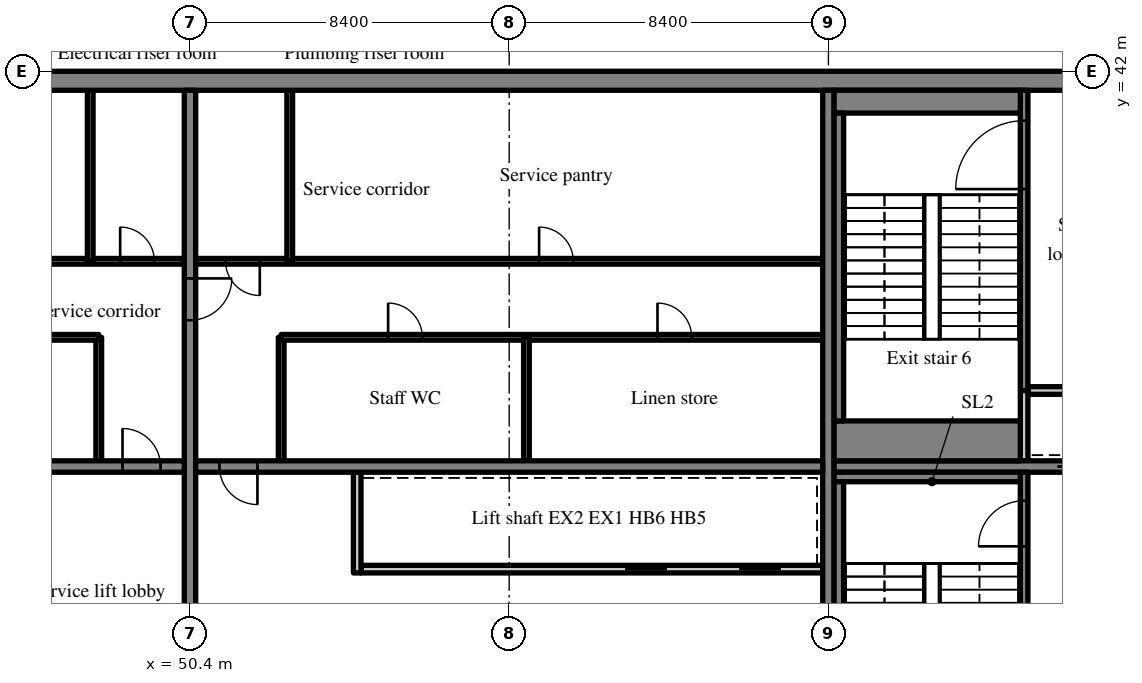
"""IFC4 building model, lengths in metres.
Left out: names, types, materials, properties, quantities, classifications, styles, units other than length and angle.
Written with IfcOpenShell. Run it as: python <this file> out.ifc"""

import sys

from ifc_helpers import new_model, si_unit, direction, frame, frame_2d, origin, place, context, subcontext, project, spatial, rectangle, extrude, source, transform, mapped, element, fill, save


model = new_model("IFC4")
c1 = context("Model", 3, precision=1e-05, world=origin(), true_north=direction((0.0, 1.0)))
c2 = subcontext(c1, "Body", "Model", "MODEL_VIEW")
j1 = project(units=[si_unit("LENGTHUNIT", "METRE"), si_unit("PLANEANGLEUNIT", "RADIAN")], contexts=[c1])
p1 = place(None, origin())
s1 = spatial("IfcSite", under=j1, at=p1, CompositionType="ELEMENT")
p2 = place(p1, origin())
s2 = spatial("IfcBuilding", under=s1, at=p2, CompositionType="ELEMENT")
p3 = place(p2, frame((0.0, 0.0, 277.7)))
s3 = spatial("IfcBuildingStorey", under=s2, at=p3, CompositionType="ELEMENT", Elevation=277.7)
m1 = source(origin(), c2, "Body", "SweptSolid", [
    extrude(rectangle(XDim=50.4, YDim=0.5, at=frame_2d((25.2, 0.0))), origin(), (0.0, 0.0, 1.0), 3.72),
])
p4 = place(p3, frame((25.2, 41.75, 0.0), z_axis=(0.0, 0.0, 1.0), x_axis=(1.0, 0.0, 0.0)))
e1 = element("IfcWall", 1, at=p4, inside=s3, PredefinedType="SHEAR", context=c2, shape_type="MappedRepresentation", body=[
    mapped(m1, transform((0.0, 0.0, 0.0), scale=1.0)),
])
m2 = source(origin(), c2, "Body", "SweptSolid", [
    extrude(rectangle(XDim=19.0, YDim=0.3, at=frame_2d((9.5, 0.0))), origin(), (0.0, 0.0, 1.0), 3.72),
])
p5 = place(p3, frame((50.4, 22.5, 0.0), z_axis=(0.0, 0.0, 1.0), x_axis=(0.0, 1.0, 0.0)))
e2 = element("IfcWall", 2, at=p5, inside=s3, PredefinedType="SHEAR", context=c2, shape_type="MappedRepresentation", body=[
    mapped(m2, transform((0.0, 0.0, 0.0), scale=1.0)),
])
m3 = source(origin(), c2, "Body", "SweptSolid", [
    extrude(rectangle(XDim=1.1, YDim=2.1, at=frame_2d((0.55, 1.05))), frame((0.0, 0.16, 0.0), z_axis=(0.0, -1.0, 0.0), x_axis=(1.0, 0.0, 0.0)), (0.0, 0.0, 1.0), 0.32),
])
p6 = place(p5, frame((12.95, 0.0, 0.0)))
e3 = element("IfcOpeningElement", 3, at=p6, cuts=e2, PredefinedType="OPENING", context=c2, shape_type="MappedRepresentation", body=[
    mapped(m3, transform((0.0, 0.0, 0.0), scale=1.0)),
])
p7 = place(p3, frame((67.2, 22.5, 0.0), z_axis=(0.0, 0.0, 1.0), x_axis=(0.0, 1.0, 0.0)))
e4 = element("IfcWall", 4, at=p7, inside=s3, PredefinedType="SHEAR", context=c2, shape_type="MappedRepresentation", body=[
    mapped(m2, transform((0.0, 0.0, 0.0), scale=1.0)),
])
m4 = source(origin(), c2, "Body", "SweptSolid", [
    extrude(rectangle(XDim=16.5, YDim=0.3, at=frame_2d((8.25, 0.0))), origin(), (0.0, 0.0, 1.0), 3.72),
])
p8 = place(p3, frame((33.75, 31.6, 0.0), z_axis=(0.0, 0.0, 1.0), x_axis=(1.0, 0.0, 0.0)))
e5 = element("IfcWall", 5, at=p8, inside=s3, PredefinedType="SHEAR", context=c2, shape_type="MappedRepresentation", body=[
    mapped(m4, transform((0.0, 0.0, 0.0), scale=1.0)),
])
m5 = source(origin(), c2, "Body", "SweptSolid", [
    extrude(rectangle(XDim=1.0, YDim=2.1, at=frame_2d((0.5, 1.05))), frame((0.0, 0.16, 0.0), z_axis=(0.0, -1.0, 0.0), x_axis=(1.0, 0.0, 0.0)), (0.0, 0.0, 1.0), 0.32),
])
p9 = place(p8, frame((14.875, 0.0, 0.0)))
e6 = element("IfcOpeningElement", 6, at=p9, cuts=e5, PredefinedType="OPENING", context=c2, shape_type="MappedRepresentation", body=[
    mapped(m5, transform((0.0, 0.0, 0.0), scale=1.0)),
])
p10 = place(p3, frame((50.55, 31.6, 0.0), z_axis=(0.0, 0.0, 1.0), x_axis=(1.0, 0.0, 0.0)))
e7 = element("IfcWall", 7, at=p10, inside=s3, PredefinedType="SHEAR", context=c2, shape_type="MappedRepresentation", body=[
    mapped(m4, transform((0.0, 0.0, 0.0), scale=1.0)),
])
p11 = place(p10, frame((0.625, 0.0, 0.0)))
e8 = element("IfcOpeningElement", 8, at=p11, cuts=e7, PredefinedType="OPENING", context=c2, shape_type="MappedRepresentation", body=[
    mapped(m5, transform((0.0, 0.0, 0.0), scale=1.0)),
])
m6 = source(origin(), c2, "Body", "SweptSolid", [
    extrude(rectangle(XDim=7.75, YDim=0.3, at=frame_2d((3.875, 0.0))), origin(), (0.0, 0.0, 1.0), 3.72),
])
p12 = place(p3, frame((67.35, 31.6, 0.0), z_axis=(0.0, 0.0, 1.0), x_axis=(1.0, 0.0, 0.0)))
e9 = element("IfcWall", 9, at=p12, inside=s3, PredefinedType="SHEAR", context=c2, shape_type="MappedRepresentation", body=[
    mapped(m6, transform((0.0, 0.0, 0.0), scale=1.0)),
])
p13 = place(p12, frame((5.875, 0.0, 0.0)))
e10 = element("IfcOpeningElement", 10, at=p13, cuts=e9, PredefinedType="OPENING", context=c2, shape_type="MappedRepresentation", body=[
    mapped(m3, transform((0.0, 0.0, 0.0), scale=1.0)),
])
m7 = source(origin(), c2, "Body", "SweptSolid", [
    extrude(rectangle(XDim=3.25, YDim=0.15, at=frame_2d((1.625, 0.0))), origin(), (0.0, 0.0, 1.0), 3.72),
])
p14 = place(p3, frame((48.0, 31.75, 0.0), z_axis=(0.0, 0.0, 1.0), x_axis=(0.0, 1.0, 0.0)))
e11 = element("IfcWall", 11, at=p14, inside=s3, PredefinedType="PARTITIONING", context=c2, shape_type="MappedRepresentation", body=[
    mapped(m7, transform((0.0, 0.0, 0.0), scale=1.0)),
])
m8 = source(origin(), c2, "Body", "SweptSolid", [
    extrude(rectangle(XDim=14.25, YDim=0.15, at=frame_2d((7.125, 0.0))), origin(), (0.0, 0.0, 1.0), 3.72),
])
p15 = place(p3, frame((33.75, 35.0, 0.0), z_axis=(0.0, 0.0, 1.0), x_axis=(1.0, 0.0, 0.0)))
e12 = element("IfcWall", 12, at=p15, inside=s3, PredefinedType="PARTITIONING", context=c2, shape_type="MappedRepresentation", body=[
    mapped(m8, transform((0.0, 0.0, 0.0), scale=1.0)),
])
m9 = source(origin(), c2, "Body", "SweptSolid", [
    extrude(rectangle(XDim=0.9, YDim=2.1, at=frame_2d((0.45, 1.05))), frame((0.0, 0.085, 0.0), z_axis=(0.0, -1.0, 0.0), x_axis=(1.0, 0.0, 0.0)), (0.0, 0.0, 1.0), 0.17),
])
p16 = place(p15, frame((6.637, 0.0, 0.0)))
e13 = element("IfcOpeningElement", 13, at=p16, cuts=e12, PredefinedType="OPENING", context=c2, shape_type="MappedRepresentation", body=[
    mapped(m9, transform((0.0, 0.0, 0.0), scale=1.0)),
])
m10 = source(origin(), c2, "Body", "SweptSolid", [
    extrude(rectangle(XDim=16.5, YDim=0.15, at=frame_2d((8.25, 0.0))), origin(), (0.0, 0.0, 1.0), 3.72),
])
p17 = place(p3, frame((33.75, 37.0, 0.0), z_axis=(0.0, 0.0, 1.0), x_axis=(1.0, 0.0, 0.0)))
e14 = element("IfcWall", 14, at=p17, inside=s3, PredefinedType="PARTITIONING", context=c2, shape_type="MappedRepresentation", body=[
    mapped(m10, transform((0.0, 0.0, 0.0), scale=1.0)),
])
p18 = place(p17, frame((0.787, 0.0, 0.0)))
e15 = element("IfcOpeningElement", 15, at=p18, cuts=e14, PredefinedType="OPENING", context=c2, shape_type="MappedRepresentation", body=[
    mapped(m9, transform((0.0, 0.0, 0.0), scale=1.0)),
])
p19 = place(p17, frame((3.675, 0.0, 0.0)))
e16 = element("IfcOpeningElement", 16, at=p19, cuts=e14, PredefinedType="OPENING", context=c2, shape_type="MappedRepresentation", body=[
    mapped(m9, transform((0.0, 0.0, 0.0), scale=1.0)),
])
p20 = place(p17, frame((9.45, 0.0, 0.0)))
e17 = element("IfcOpeningElement", 17, at=p20, cuts=e14, PredefinedType="OPENING", context=c2, shape_type="MappedRepresentation", body=[
    mapped(m9, transform((0.0, 0.0, 0.0), scale=1.0)),
])
p21 = place(p17, frame((14.813, 0.0, 0.0)))
e18 = element("IfcOpeningElement", 18, at=p21, cuts=e14, PredefinedType="OPENING", context=c2, shape_type="MappedRepresentation", body=[
    mapped(m9, transform((0.0, 0.0, 0.0), scale=1.0)),
])
m11 = source(origin(), c2, "Body", "SweptSolid", [
    extrude(rectangle(XDim=4.5, YDim=0.15, at=frame_2d((2.25, 0.0))), origin(), (0.0, 0.0, 1.0), 3.72),
])
p22 = place(p3, frame((47.775, 37.0, 0.0), z_axis=(0.0, 0.0, 1.0), x_axis=(0.0, 1.0, 0.0)))
e19 = element("IfcWall", 19, at=p22, inside=s3, PredefinedType="PARTITIONING", context=c2, shape_type="MappedRepresentation", body=[
    mapped(m11, transform((0.0, 0.0, 0.0), scale=1.0)),
])
m12 = source(origin(), c2, "Body", "SweptSolid", [
    extrude(rectangle(XDim=12.15, YDim=0.2, at=frame_2d((6.075, 0.0))), origin(), (0.0, 0.0, 1.0), 3.72),
])
p23 = place(p3, frame((67.05, 28.9, 0.0), z_axis=(0.0, 0.0, 1.0), x_axis=(-1.0, 0.0, 0.0)))
e20 = element("IfcWall", 20, at=p23, inside=s3, PredefinedType="SOLIDWALL", context=c2, shape_type="MappedRepresentation", body=[
    mapped(m12, transform((0.0, 0.0, 0.0), scale=1.0)),
])
m13 = source(origin(), c2, "Body", "SweptSolid", [
    extrude(rectangle(XDim=1.1, YDim=2.1, at=frame_2d((0.55, 1.05))), frame((0.0, 0.11, 0.0), z_axis=(0.0, -1.0, 0.0), x_axis=(1.0, 0.0, 0.0)), (0.0, 0.0, 1.0), 0.22),
])
p24 = place(p23, frame((1.1, 0.0, 0.0)))
e21 = element("IfcOpeningElement", 21, at=p24, cuts=e20, PredefinedType="OPENING", context=c2, shape_type="MappedRepresentation", body=[
    mapped(m13, transform((0.0, 0.0, 0.0), scale=1.0)),
])
p25 = place(p23, frame((4.1, 0.0, 0.0)))
e22 = element("IfcOpeningElement", 22, at=p25, cuts=e20, PredefinedType="OPENING", context=c2, shape_type="MappedRepresentation", body=[
    mapped(m13, transform((0.0, 0.0, 0.0), scale=1.0)),
])
m14 = source(origin(), c2, "Body", "SweptSolid", [
    extrude(rectangle(XDim=2.65, YDim=0.2, at=frame_2d((1.325, 0.0))), origin(), (0.0, 0.0, 1.0), 3.72),
])
p26 = place(p3, frame((54.8, 28.8, 0.0), z_axis=(0.0, 0.0, 1.0), x_axis=(0.0, 1.0, 0.0)))
e23 = element("IfcWall", 23, at=p26, inside=s3, PredefinedType="SOLIDWALL", context=c2, shape_type="MappedRepresentation", body=[
    mapped(m14, transform((0.0, 0.0, 0.0), scale=1.0)),
])
p27 = place(p3, frame((52.8, 31.75, 0.0), z_axis=(0.0, 0.0, 1.0), x_axis=(0.0, 1.0, 0.0)))
e24 = element("IfcWall", 24, at=p27, inside=s3, PredefinedType="PARTITIONING", context=c2, shape_type="MappedRepresentation", body=[
    mapped(m7, transform((0.0, 0.0, 0.0), scale=1.0)),
])
p28 = place(p3, frame((67.05, 35.0, 0.0), z_axis=(0.0, 0.0, 1.0), x_axis=(-1.0, 0.0, 0.0)))
e25 = element("IfcWall", 25, at=p28, inside=s3, PredefinedType="PARTITIONING", context=c2, shape_type="MappedRepresentation", body=[
    mapped(m8, transform((0.0, 0.0, 0.0), scale=1.0)),
])
p29 = place(p28, frame((3.448, 0.0, 0.0)))
e26 = element("IfcOpeningElement", 26, at=p29, cuts=e25, PredefinedType="OPENING", context=c2, shape_type="MappedRepresentation", body=[
    mapped(m9, transform((0.0, 0.0, 0.0), scale=1.0)),
])
p30 = place(p28, frame((10.536, 0.0, 0.0)))
e27 = element("IfcOpeningElement", 27, at=p30, cuts=e25, PredefinedType="OPENING", context=c2, shape_type="MappedRepresentation", body=[
    mapped(m9, transform((0.0, 0.0, 0.0), scale=1.0)),
])
p31 = place(p3, frame((67.05, 37.0, 0.0), z_axis=(0.0, 0.0, 1.0), x_axis=(-1.0, 0.0, 0.0)))
e28 = element("IfcWall", 28, at=p31, inside=s3, PredefinedType="PARTITIONING", context=c2, shape_type="MappedRepresentation", body=[
    mapped(m10, transform((0.0, 0.0, 0.0), scale=1.0)),
])
p32 = place(p31, frame((6.563, 0.0, 0.0)))
e29 = element("IfcOpeningElement", 29, at=p32, cuts=e28, PredefinedType="OPENING", context=c2, shape_type="MappedRepresentation", body=[
    mapped(m9, transform((0.0, 0.0, 0.0), scale=1.0)),
])
p33 = place(p31, frame((14.813, 0.0, 0.0)))
e30 = element("IfcOpeningElement", 30, at=p33, cuts=e28, PredefinedType="OPENING", context=c2, shape_type="MappedRepresentation", body=[
    mapped(m9, transform((0.0, 0.0, 0.0), scale=1.0)),
])
p34 = place(p3, frame((59.254, 31.75, 0.0), z_axis=(0.0, 0.0, 1.0), x_axis=(0.0, 1.0, 0.0)))
e31 = element("IfcWall", 31, at=p34, inside=s3, PredefinedType="PARTITIONING", context=c2, shape_type="MappedRepresentation", body=[
    mapped(m7, transform((0.0, 0.0, 0.0), scale=1.0)),
])
p35 = place(p3, frame((53.025, 37.0, 0.0), z_axis=(0.0, 0.0, 1.0), x_axis=(0.0, 1.0, 0.0)))
e32 = element("IfcWall", 32, at=p35, inside=s3, PredefinedType="PARTITIONING", context=c2, shape_type="MappedRepresentation", body=[
    mapped(m11, transform((0.0, 0.0, 0.0), scale=1.0)),
])
m15 = source(origin(), c2, "Body", "SweptSolid", [
    extrude(rectangle(XDim=8.95, YDim=0.2, at=frame_2d((4.475, 0.0))), origin(), (0.0, 0.0, 1.0), 3.72),
])
p36 = place(p3, frame((72.35, 22.5, 0.0), z_axis=(0.0, 0.0, 1.0), x_axis=(0.0, 1.0, 0.0)))
e33 = element("IfcWall", 33, at=p36, inside=s3, PredefinedType="SOLIDWALL", context=c2, shape_type="MappedRepresentation", body=[
    mapped(m15, transform((0.0, 0.0, 0.0), scale=1.0)),
])
m16 = source(origin(), c2, "Body", "SweptSolid", [
    extrude(rectangle(XDim=1.2, YDim=2.1, at=frame_2d((0.6, 1.05))), frame((0.0, 0.11, 0.0), z_axis=(0.0, -1.0, 0.0), x_axis=(1.0, 0.0, 0.0)), (0.0, 0.0, 1.0), 0.22),
])
p37 = place(p36, frame((7.0, 0.0, 0.0)))
e34 = element("IfcOpeningElement", 34, at=p37, cuts=e33, PredefinedType="OPENING", context=c2, shape_type="MappedRepresentation", body=[
    mapped(m16, transform((0.0, 0.0, 0.0), scale=1.0)),
])
m17 = source(origin(), c2, "Body", "SweptSolid", [
    extrude(rectangle(XDim=1.85, YDim=0.2, at=frame_2d((0.925, 0.0))), origin(), (0.0, 0.0, 1.0), 3.72),
])
p38 = place(p3, frame((72.35, 31.75, 0.0), z_axis=(0.0, 0.0, 1.0), x_axis=(0.0, 1.0, 0.0)))
e35 = element("IfcWall", 35, at=p38, inside=s3, PredefinedType="SOLIDWALL", context=c2, shape_type="MappedRepresentation", body=[
    mapped(m17, transform((0.0, 0.0, 0.0), scale=1.0)),
])
m18 = source(origin(), c2, "Body", "SweptSolid", [
    extrude(rectangle(XDim=2.65, YDim=0.2, at=frame_2d((1.325, 0.0))), origin(), (0.0, 0.0, 1.0), 3.72),
])
p39 = place(p3, frame((72.45, 33.6, 0.0), z_axis=(0.0, 0.0, 1.0), x_axis=(1.0, 0.0, 0.0)))
e36 = element("IfcWall", 36, at=p39, inside=s3, PredefinedType="SOLIDWALL", context=c2, shape_type="MappedRepresentation", body=[
    mapped(m18, transform((0.0, 0.0, 0.0), scale=1.0)),
])
m19 = source(origin(), c2, "Body", "SweptSolid", [
    extrude(rectangle(XDim=7.9, YDim=0.2, at=frame_2d((3.95, 0.0))), origin(), (0.0, 0.0, 1.0), 3.72),
])
p40 = place(p3, frame((72.35, 33.6, 0.0), z_axis=(0.0, 0.0, 1.0), x_axis=(0.0, 1.0, 0.0)))
e37 = element("IfcWall", 37, at=p40, inside=s3, PredefinedType="SOLIDWALL", context=c2, shape_type="MappedRepresentation", body=[
    mapped(m19, transform((0.0, 0.0, 0.0), scale=1.0)),
])
m20 = source(origin(), c2, "Body", "SweptSolid", [
    extrude(rectangle(XDim=1.8, YDim=2.1, at=frame_2d((0.9, 1.05))), frame((0.0, 0.11, 0.0), z_axis=(0.0, -1.0, 0.0), x_axis=(1.0, 0.0, 0.0)), (0.0, 0.0, 1.0), 0.22),
])
p41 = place(p40, frame((5.3, 0.0, 0.0)))
e38 = element("IfcOpeningElement", 38, at=p41, cuts=e37, PredefinedType="OPENING", context=c2, shape_type="MappedRepresentation", body=[
    mapped(m20, transform((0.0, 0.0, 0.0), scale=1.0)),
])
m21 = source(origin(), c2, "Body", "SweptSolid", [
    extrude(rectangle(XDim=4.9, YDim=0.25, at=frame_2d((2.45, 0.0))), origin(), (0.0, 0.0, 1.0), 3.72),
])
p42 = place(p3, frame((67.35, 31.325, 0.0), z_axis=(0.0, 0.0, 1.0), x_axis=(1.0, 0.0, 0.0)))
e39 = element("IfcWall", 39, at=p42, inside=s3, PredefinedType="SOLIDWALL", context=c2, shape_type="MappedRepresentation", body=[
    mapped(m21, transform((0.0, 0.0, 0.0), scale=1.0)),
])
m22 = source(origin(), c2, "Body", "SweptSolid", [
    extrude(rectangle(XDim=8.1, YDim=0.25, at=frame_2d((4.05, 0.0))), origin(), (0.0, 0.0, 1.0), 3.72),
])
p43 = place(p3, frame((67.475, 23.1, 0.0), z_axis=(0.0, 0.0, 1.0), x_axis=(0.0, 1.0, 0.0)))
e40 = element("IfcWall", 40, at=p43, inside=s3, PredefinedType="SOLIDWALL", context=c2, shape_type="MappedRepresentation", body=[
    mapped(m22, transform((0.0, 0.0, 0.0), scale=1.0)),
])
m23 = source(origin(), c2, "Body", "SweptSolid", [
    extrude(rectangle(XDim=4.9, YDim=0.6, at=frame_2d((2.45, 0.0))), origin(), (0.0, 0.0, 1.0), 3.72),
])
p44 = place(p3, frame((67.35, 41.2, 0.0), z_axis=(0.0, 0.0, 1.0), x_axis=(1.0, 0.0, 0.0)))
e41 = element("IfcWall", 41, at=p44, inside=s3, PredefinedType="SOLIDWALL", context=c2, shape_type="MappedRepresentation", body=[
    mapped(m23, transform((0.0, 0.0, 0.0), scale=1.0)),
])
m24 = source(origin(), c2, "Body", "SweptSolid", [
    extrude(rectangle(XDim=4.9, YDim=1.05, at=frame_2d((2.45, 0.0))), origin(), (0.0, 0.0, 1.0), 3.72),
])
p45 = place(p3, frame((67.35, 32.275, 0.0), z_axis=(0.0, 0.0, 1.0), x_axis=(1.0, 0.0, 0.0)))
e42 = element("IfcWall", 42, at=p45, inside=s3, PredefinedType="SOLIDWALL", context=c2, shape_type="MappedRepresentation", body=[
    mapped(m24, transform((0.0, 0.0, 0.0), scale=1.0)),
])
p46 = place(p3, frame((67.475, 32.8, 0.0), z_axis=(0.0, 0.0, 1.0), x_axis=(0.0, 1.0, 0.0)))
e43 = element("IfcWall", 43, at=p46, inside=s3, PredefinedType="SOLIDWALL", context=c2, shape_type="MappedRepresentation", body=[
    mapped(m22, transform((0.0, 0.0, 0.0), scale=1.0)),
])
m25 = source(origin(), c2, "Body", "SweptSolid", [
    extrude(rectangle(XDim=1.0, YDim=2.1, at=frame_2d((0.5, 1.05))), frame((0.0, 0.025, 0.0), z_axis=(0.0, -1.0, 0.0), x_axis=(1.0, 0.0, 0.0)), (0.0, 0.0, 1.0), 0.05),
])
p47 = place(p9, origin())
e44 = element("IfcDoor", 44, at=p47, inside=s3, OperationType="SINGLE_SWING_LEFT", PredefinedType="DOOR", context=c2, shape_type="MappedRepresentation", body=[
    mapped(m25, transform((0.0, 0.0, 0.0), scale=1.0)),
])
fill(e6, e44)
m26 = source(origin(), c2, "Body", "SweptSolid", [
    extrude(rectangle(XDim=0.9, YDim=2.1, at=frame_2d((0.45, 1.05))), frame((0.0, 0.025, 0.0), z_axis=(0.0, -1.0, 0.0), x_axis=(1.0, 0.0, 0.0)), (0.0, 0.0, 1.0), 0.05),
])
p48 = place(p21, origin())
e45 = element("IfcDoor", 45, at=p48, inside=s3, OperationType="SINGLE_SWING_LEFT", PredefinedType="DOOR", context=c2, shape_type="MappedRepresentation", body=[
    mapped(m26, transform((0.0, 0.0, 0.0), scale=1.0)),
])
fill(e18, e45)
p49 = place(p11, origin())
e46 = element("IfcDoor", 46, at=p49, inside=s3, OperationType="SINGLE_SWING_RIGHT", PredefinedType="DOOR", context=c2, shape_type="MappedRepresentation", body=[
    mapped(m25, transform((0.0, 0.0, 0.0), scale=1.0)),
])
fill(e8, e46)
m27 = source(origin(), c2, "Body", "SweptSolid", [
    extrude(rectangle(XDim=1.1, YDim=2.1, at=frame_2d((0.55, 1.05))), frame((0.0, 0.025, 0.0), z_axis=(0.0, -1.0, 0.0), x_axis=(1.0, 0.0, 0.0)), (0.0, 0.0, 1.0), 0.05),
])
p50 = place(p24, origin())
e47 = element("IfcDoor", 47, at=p50, inside=s3, OperationType="SLIDING_TO_RIGHT", PredefinedType="DOOR", context=c2, shape_type="MappedRepresentation", body=[
    mapped(m27, transform((0.0, 0.0, 0.0), scale=1.0)),
])
fill(e21, e47)
p51 = place(p25, origin())
e48 = element("IfcDoor", 48, at=p51, inside=s3, OperationType="SLIDING_TO_LEFT", PredefinedType="DOOR", context=c2, shape_type="MappedRepresentation", body=[
    mapped(m27, transform((0.0, 0.0, 0.0), scale=1.0)),
])
fill(e22, e48)
p52 = place(p29, origin())
e49 = element("IfcDoor", 49, at=p52, inside=s3, OperationType="SINGLE_SWING_RIGHT", PredefinedType="DOOR", context=c2, shape_type="MappedRepresentation", body=[
    mapped(m26, transform((0.0, 0.0, 0.0), scale=1.0)),
])
fill(e26, e49)
p53 = place(p30, origin())
e50 = element("IfcDoor", 50, at=p53, inside=s3, OperationType="SINGLE_SWING_RIGHT", PredefinedType="DOOR", context=c2, shape_type="MappedRepresentation", body=[
    mapped(m26, transform((0.0, 0.0, 0.0), scale=1.0)),
])
fill(e27, e50)
p54 = place(p32, origin())
e51 = element("IfcDoor", 51, at=p54, inside=s3, OperationType="SINGLE_SWING_RIGHT", PredefinedType="DOOR", context=c2, shape_type="MappedRepresentation", body=[
    mapped(m26, transform((0.0, 0.0, 0.0), scale=1.0)),
])
fill(e29, e51)
p55 = place(p33, origin())
e52 = element("IfcDoor", 52, at=p55, inside=s3, OperationType="SINGLE_SWING_LEFT", PredefinedType="DOOR", context=c2, shape_type="MappedRepresentation", body=[
    mapped(m26, transform((0.0, 0.0, 0.0), scale=1.0)),
])
fill(e30, e52)
m28 = source(origin(), c2, "Body", "SweptSolid", [
    extrude(rectangle(XDim=1.2, YDim=2.1, at=frame_2d((0.6, 1.05))), frame((0.0, 0.025, 0.0), z_axis=(0.0, -1.0, 0.0), x_axis=(1.0, 0.0, 0.0)), (0.0, 0.0, 1.0), 0.05),
])
p56 = place(p37, origin())
e53 = element("IfcDoor", 53, at=p56, inside=s3, OperationType="SINGLE_SWING_LEFT", PredefinedType="DOOR", context=c2, shape_type="MappedRepresentation", body=[
    mapped(m28, transform((0.0, 0.0, 0.0), scale=1.0)),
])
fill(e34, e53)
p57 = place(p13, origin())
e54 = element("IfcDoor", 54, at=p57, inside=s3, OperationType="SLIDING_TO_RIGHT", PredefinedType="DOOR", context=c2, shape_type="MappedRepresentation", body=[
    mapped(m27, transform((0.0, 0.0, 0.0), scale=1.0)),
])
fill(e10, e54)
m29 = source(origin(), c2, "Body", "SweptSolid", [
    extrude(rectangle(XDim=1.8, YDim=2.1, at=frame_2d((0.9, 1.05))), frame((0.0, 0.025, 0.0), z_axis=(0.0, -1.0, 0.0), x_axis=(1.0, 0.0, 0.0)), (0.0, 0.0, 1.0), 0.05),
])
p58 = place(p41, origin())
e55 = element("IfcDoor", 55, at=p58, inside=s3, OperationType="SINGLE_SWING_LEFT", PredefinedType="DOOR", context=c2, shape_type="MappedRepresentation", body=[
    mapped(m29, transform((0.0, 0.0, 0.0), scale=1.0)),
])
fill(e38, e55)
p59 = place(p6, origin())
e56 = element("IfcDoor", 56, at=p59, inside=s3, OperationType="SINGLE_SWING_RIGHT", PredefinedType="DOOR", context=c2, shape_type="MappedRepresentation", body=[
    mapped(m27, transform((0.0, 0.0, 0.0), scale=1.0)),
])
fill(e3, e56)
save(model, sys.argv[1])
